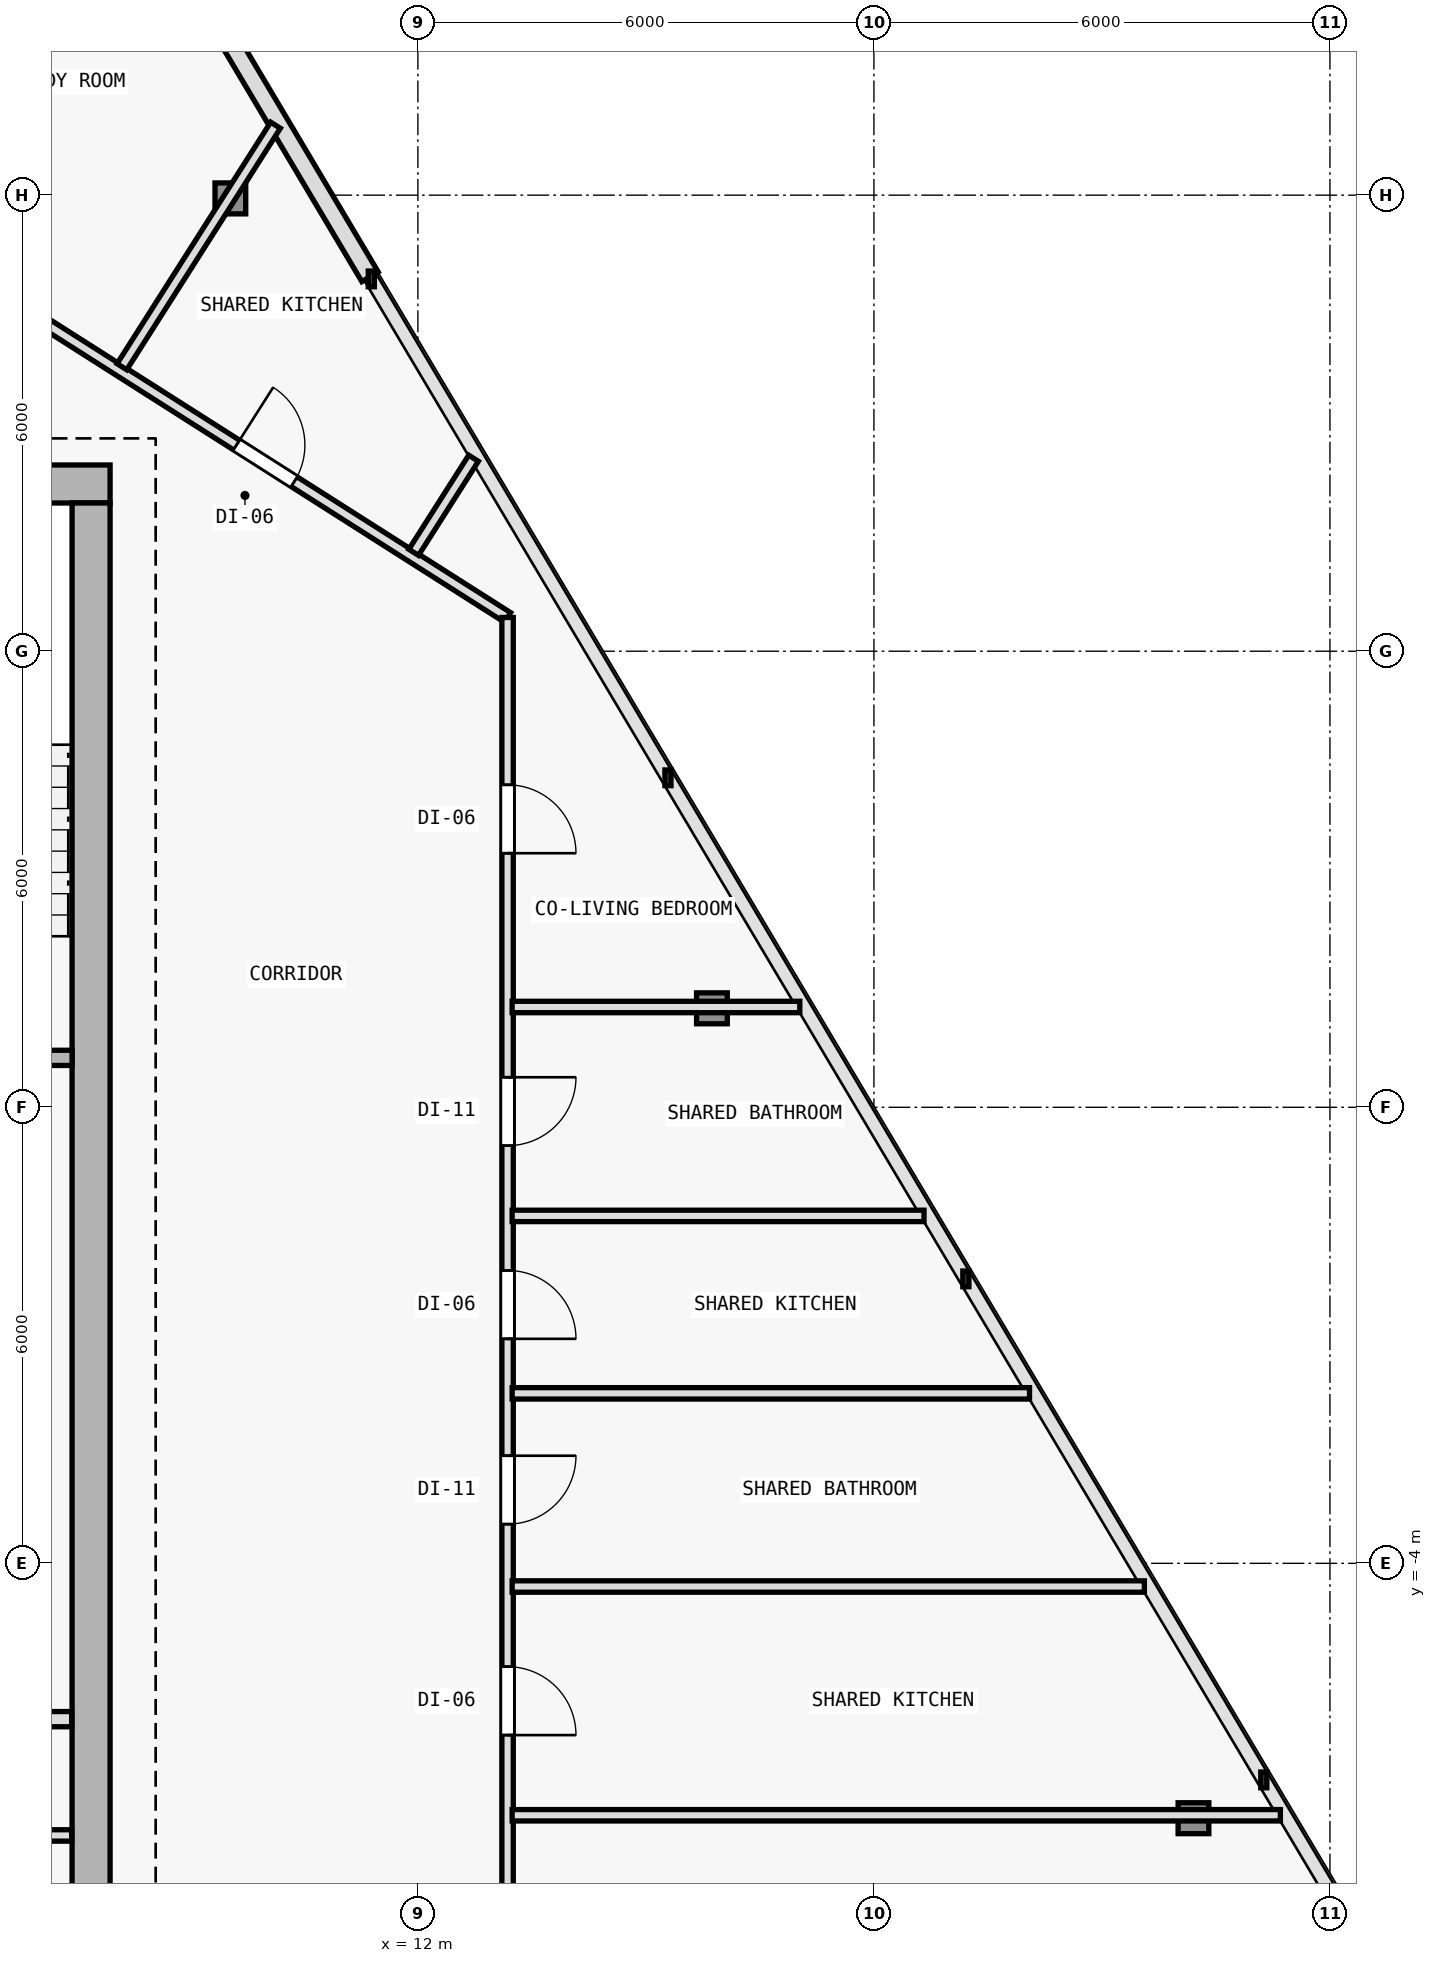
"""IFC4 building model, lengths in metres.
Left out: names, types, materials, properties, quantities, classifications, styles, units other than length and angle.
Written with IfcOpenShell. Run it as: python <this file> out.ifc"""

import sys

from ifc_helpers import new_model, si_unit, direction, frame, frame_2d, origin, origin_2d, place, context, subcontext, project, spatial, rectangle, i_section, extrude, element, fill, save


model = new_model("IFC4")
c1 = context("Model", 3, precision=1e-05, world=origin(), true_north=direction((0.0, 1.0)))
c2 = subcontext(c1, "Body", "Model", "MODEL_VIEW")
j1 = project(units=[si_unit("LENGTHUNIT", "METRE"), si_unit("PLANEANGLEUNIT", "RADIAN")], contexts=[c1])
p1 = place(None, origin())
s1 = spatial("IfcSite", under=j1, at=p1, CompositionType="ELEMENT")
p2 = place(p1, origin())
s2 = spatial("IfcBuilding", under=s1, at=p2, CompositionType="ELEMENT")
p3 = place(p2, frame((0.0, 0.0, 145.8)))
s3 = spatial("IfcBuildingStorey", under=s2, at=p3, CompositionType="ELEMENT", Elevation=145.8)
for number, where, z_axis, x_axis in (
    (1, (7.7, 10.2, 0.0), (0.0, 0.0, 1.0), (1.0, 0.0, 0.0)),
    (2, (7.7, 0.4, 0.0), (0.0, 0.0, 1.0), (1.0, 0.0, 0.0)),
):
    element("IfcColumn", number, at=place(p3, frame(where, z_axis=z_axis, x_axis=x_axis)), inside=s3, PredefinedType="COLUMN", context=c2, shape_type="SweptSolid", body=[
        extrude(i_section(OverallWidth=0.404, OverallDepth=0.407, WebThickness=0.017, FlangeThickness=0.028, FilletRadius=0.015, at=origin_2d()), origin(), (0.0, 0.0, 1.0), 3.6),
    ])
p4 = place(p3, frame((22.204, -7.353, 0.005), z_axis=(-0.026105663043, 0.021618752208, 0.999425396871), x_axis=(-0.637813971185, -0.770190455771, 0.0)))
e3 = element("IfcColumn", 3, at=p4, inside=s3, PredefinedType="COLUMN", context=c2, shape_type="SweptSolid", body=[
    extrude(i_section(OverallWidth=0.404, OverallDepth=0.407, WebThickness=0.017, FlangeThickness=0.028, FilletRadius=0.015, at=origin_2d()), origin(), (0.0, 0.0, 1.0), 3.591),
])
p5 = place(p3, frame((15.869, 3.302, 0.005), z_axis=(-0.018974023902, 0.009521015578, 0.999774642947), x_axis=(-0.44849454954, -0.893785566583, 0.0)))
e4 = element("IfcColumn", 4, at=p5, inside=s3, PredefinedType="COLUMN", context=c2, shape_type="SweptSolid", body=[
    extrude(i_section(OverallWidth=0.404, OverallDepth=0.407, WebThickness=0.017, FlangeThickness=0.028, FilletRadius=0.015, at=origin_2d()), origin(), (0.0, 0.0, 1.0), 3.59),
])
p6 = place(p3, frame((9.533, 13.957, 0.005), z_axis=(-0.011767054935, -0.002516653368, 0.999927598816), x_axis=(0.209143047003, -0.977885057607, 0.0)))
e5 = element("IfcColumn", 5, at=p6, inside=s3, PredefinedType="COLUMN", context=c2, shape_type="SweptSolid", body=[
    extrude(i_section(OverallWidth=0.404, OverallDepth=0.407, WebThickness=0.017, FlangeThickness=0.028, FilletRadius=0.015, at=origin_2d()), origin(), (0.0, 0.0, 1.0), 3.589),
])
p7 = place(p3, frame((5.862, 22.19, 0.0), z_axis=(0.0, 0.0, 1.0), x_axis=(0.511083986456, -0.859530778267, 0.0)))
e6 = element("IfcWall", 6, at=p7, inside=s3, PredefinedType="SOLIDWALL", context=c2, shape_type="SweptSolid", body=[
    extrude(rectangle(XDim=10.778, YDim=0.25, at=frame_2d((5.389, 0.0))), origin(), (0.0, 0.0, 1.0), 3.35),
])
p8 = place(p7, frame((4.939, 0.0, 0.62)))
e7 = element("IfcOpeningElement", 7, at=p8, cuts=e6, PredefinedType="OPENING", context=c2, shape_type="SweptSolid", body=[
    extrude(rectangle(XDim=0.9, YDim=1.6, at=frame_2d((0.45, 0.8))), frame((0.0, 0.135, 0.0), z_axis=(0.0, -1.0, 0.0), x_axis=(1.0, 0.0, 0.0)), (0.0, 0.0, 1.0), 0.27),
])
p9 = place(p3, frame((7.95, 10.2, 0.0), z_axis=(0.0, 0.0, 1.0), x_axis=(-1.0, 0.0, 0.0)))
e8 = element("IfcWall", 8, at=p9, inside=s3, PredefinedType="SHEAR", context=c2, shape_type="SweptSolid", body=[
    extrude(rectangle(XDim=15.9, YDim=0.5, at=frame_2d((7.95, 0.0))), origin(), (0.0, 0.0, 1.0), 3.35),
])
p10 = place(p9, frame((4.4, 0.0, 0.0)))
e9 = element("IfcOpeningElement", 9, at=p10, cuts=e8, PredefinedType="OPENING", context=c2, shape_type="SweptSolid", body=[
    extrude(rectangle(XDim=1.1, YDim=2.15, at=frame_2d((0.55, 1.075))), frame((0.0, 0.26, 0.0), z_axis=(0.0, -1.0, 0.0), x_axis=(1.0, 0.0, 0.0)), (0.0, 0.0, 1.0), 0.52),
])
p11 = place(p3, frame((7.7, 9.95, 0.0), z_axis=(0.0, 0.0, 1.0), x_axis=(0.0, -1.0, 0.0)))
e10 = element("IfcWall", 10, at=p11, inside=s3, PredefinedType="SHEAR", context=c2, shape_type="SweptSolid", body=[
    extrude(rectangle(XDim=19.1, YDim=0.5, at=frame_2d((9.55, 0.0))), origin(), (0.0, 0.0, 1.0), 3.35),
])
p12 = place(p3, frame((4.05, 2.65, 0.0), z_axis=(0.0, 0.0, 1.0), x_axis=(1.0, 0.0, 0.0)))
e11 = element("IfcWall", 11, at=p12, inside=s3, PredefinedType="SOLIDWALL", context=c2, shape_type="SweptSolid", body=[
    extrude(rectangle(XDim=3.4, YDim=0.2, at=frame_2d((1.7, 0.0))), origin(), (0.0, 0.0, 1.0), 3.35),
])
p13 = place(p3, frame((4.15, -6.05, 0.0), z_axis=(0.0, 0.0, 1.0), x_axis=(1.0, 0.0, 0.0)))
e12 = element("IfcWall", 12, at=p13, inside=s3, PredefinedType="SOLIDWALL", context=c2, shape_type="SweptSolid", body=[
    extrude(rectangle(XDim=3.295, YDim=0.2, at=frame_2d((1.647, 0.0))), origin(), (0.0, 0.0, 1.0), 3.35),
])
p14 = place(p3, frame((4.15, -7.58, 0.0), z_axis=(0.0, 0.0, 1.0), x_axis=(1.0, 0.0, 0.0)))
e13 = element("IfcWall", 13, at=p14, inside=s3, PredefinedType="PARTITIONING", context=c2, shape_type="SweptSolid", body=[
    extrude(rectangle(XDim=3.295, YDim=0.15, at=frame_2d((1.647, 0.0))), origin(), (0.0, 0.0, 1.0), 3.35),
])
p15 = place(p3, frame((7.023, 12.36, 0.0), z_axis=(0.0, 0.0, 1.0), x_axis=(0.84376480085, -0.536713108511, 0.0)))
e14 = element("IfcWall", 14, at=p15, inside=s3, PredefinedType="PARTITIONING", context=c2, shape_type="SweptSolid", body=[
    extrude(rectangle(XDim=7.297, YDim=0.15, at=frame_2d((3.648, 0.0))), origin(), (0.0, 0.0, 1.0), 2.725),
])
p16 = place(p15, frame((3.07, 0.0, 0.0)))
e15 = element("IfcOpeningElement", 15, at=p16, cuts=e14, PredefinedType="OPENING", context=c2, shape_type="SweptSolid", body=[
    extrude(rectangle(XDim=0.9, YDim=2.1, at=frame_2d((0.45, 1.05))), frame((0.0, 0.085, 0.0), z_axis=(0.0, -1.0, 0.0), x_axis=(1.0, 0.0, 0.0)), (0.0, 0.0, 1.0), 0.17),
])
p17 = place(p3, frame((13.18, 8.444, 0.0), z_axis=(0.0, 0.0, 1.0), x_axis=(0.0, -1.0, 0.0)))
e16 = element("IfcWall", 16, at=p17, inside=s3, PredefinedType="PARTITIONING", context=c2, shape_type="SweptSolid", body=[
    extrude(rectangle(XDim=20.004, YDim=0.15, at=frame_2d((10.002, 0.0))), origin(), (0.0, 0.0, 1.0), 2.775),
])
p18 = place(p17, frame((17.342, 0.0, 0.0)))
e17 = element("IfcOpeningElement", 17, at=p18, cuts=e16, PredefinedType="OPENING", context=c2, shape_type="SweptSolid", body=[
    extrude(rectangle(XDim=0.9, YDim=2.1, at=frame_2d((0.45, 1.05))), frame((0.0, 0.085, 0.0), z_axis=(0.0, -1.0, 0.0), x_axis=(1.0, 0.0, 0.0)), (0.0, 0.0, 1.0), 0.17),
])
p19 = place(p17, frame((13.804, 0.0, 0.0)))
e18 = element("IfcOpeningElement", 18, at=p19, cuts=e16, PredefinedType="OPENING", context=c2, shape_type="SweptSolid", body=[
    extrude(rectangle(XDim=0.9, YDim=2.1, at=frame_2d((0.45, 1.05))), frame((0.0, 0.085, 0.0), z_axis=(0.0, -1.0, 0.0), x_axis=(1.0, 0.0, 0.0)), (0.0, 0.0, 1.0), 0.17),
])
p20 = place(p17, frame((11.028, 0.0, 0.0)))
e19 = element("IfcOpeningElement", 19, at=p20, cuts=e16, PredefinedType="OPENING", context=c2, shape_type="SweptSolid", body=[
    extrude(rectangle(XDim=0.9, YDim=2.1, at=frame_2d((0.45, 1.05))), frame((0.0, 0.085, 0.0), z_axis=(0.0, -1.0, 0.0), x_axis=(1.0, 0.0, 0.0)), (0.0, 0.0, 1.0), 0.17),
])
p21 = place(p17, frame((8.59, 0.0, 0.0)))
e20 = element("IfcOpeningElement", 20, at=p21, cuts=e16, PredefinedType="OPENING", context=c2, shape_type="SweptSolid", body=[
    extrude(rectangle(XDim=0.9, YDim=2.1, at=frame_2d((0.45, 1.05))), frame((0.0, 0.085, 0.0), z_axis=(0.0, -1.0, 0.0), x_axis=(1.0, 0.0, 0.0)), (0.0, 0.0, 1.0), 0.17),
])
p22 = place(p17, frame((6.049, 0.0, 0.0)))
e21 = element("IfcOpeningElement", 21, at=p22, cuts=e16, PredefinedType="OPENING", context=c2, shape_type="SweptSolid", body=[
    extrude(rectangle(XDim=0.9, YDim=2.1, at=frame_2d((0.45, 1.05))), frame((0.0, 0.085, 0.0), z_axis=(0.0, -1.0, 0.0), x_axis=(1.0, 0.0, 0.0)), (0.0, 0.0, 1.0), 0.17),
])
p23 = place(p17, frame((2.201, 0.0, 0.0)))
e22 = element("IfcOpeningElement", 22, at=p23, cuts=e16, PredefinedType="OPENING", context=c2, shape_type="SweptSolid", body=[
    extrude(rectangle(XDim=0.9, YDim=2.1, at=frame_2d((0.45, 1.05))), frame((0.0, 0.085, 0.0), z_axis=(0.0, -1.0, 0.0), x_axis=(1.0, 0.0, 0.0)), (0.0, 0.0, 1.0), 0.17),
])
p24 = place(p3, frame((13.24, -7.314, 0.0), z_axis=(0.0, 0.0, 1.0), x_axis=(1.0, 0.0, 0.0)))
e23 = element("IfcWall", 23, at=p24, inside=s3, PredefinedType="PARTITIONING", context=c2, shape_type="SweptSolid", body=[
    extrude(rectangle(XDim=10.108, YDim=0.15, at=frame_2d((5.054, 0.0))), origin(), (0.0, 0.0, 1.0), 2.775),
])
p25 = place(p3, frame((13.24, 3.319, 0.0), z_axis=(0.0, 0.0, 1.0), x_axis=(1.0, 0.0, 0.0)))
e24 = element("IfcWall", 24, at=p25, inside=s3, PredefinedType="PARTITIONING", context=c2, shape_type="SweptSolid", body=[
    extrude(rectangle(XDim=3.785, YDim=0.15, at=frame_2d((1.892, 0.0))), origin(), (0.0, 0.0, 1.0), 2.885),
])
p26 = place(p3, frame((8.106, 11.743, 0.0), z_axis=(0.0, 0.0, 1.0), x_axis=(0.53670767223, 0.843768258807, 0.0)))
e25 = element("IfcWall", 25, at=p26, inside=s3, PredefinedType="PARTITIONING", context=c2, shape_type="SweptSolid", body=[
    extrude(rectangle(XDim=3.766, YDim=0.15, at=frame_2d((1.883, 0.0))), origin(), (0.0, 0.0, 1.0), 2.885),
])
p27 = place(p3, frame((13.24, -1.764, 0.0), z_axis=(0.0, 0.0, 1.0), x_axis=(1.0, 0.0, 0.0)))
e26 = element("IfcWall", 26, at=p27, inside=s3, PredefinedType="PARTITIONING", context=c2, shape_type="SweptSolid", body=[
    extrude(rectangle(XDim=6.807, YDim=0.15, at=frame_2d((3.404, 0.0))), origin(), (0.0, 0.0, 1.0), 2.885),
])
p28 = place(p3, frame((11.945, 9.301, 0.0), z_axis=(0.0, 0.0, 1.0), x_axis=(0.536638596357, 0.843812192908, 0.0)))
e27 = element("IfcWall", 27, at=p28, inside=s3, PredefinedType="PARTITIONING", context=c2, shape_type="SweptSolid", body=[
    extrude(rectangle(XDim=1.467, YDim=0.15, at=frame_2d((0.734, 0.0))), origin(), (0.0, 0.0, 1.0), 2.885),
])
p29 = place(p3, frame((13.24, -4.305, 0.0), z_axis=(0.0, 0.0, 1.0), x_axis=(1.0, 0.0, 0.0)))
e28 = element("IfcWall", 28, at=p29, inside=s3, PredefinedType="PARTITIONING", context=c2, shape_type="SweptSolid", body=[
    extrude(rectangle(XDim=8.318, YDim=0.15, at=frame_2d((4.159, 0.0))), origin(), (0.0, 0.0, 1.0), 2.885),
])
p30 = place(p3, frame((13.24, 0.571, 0.0), z_axis=(0.0, 0.0, 1.0), x_axis=(1.0, 0.0, 0.0)))
e29 = element("IfcWall", 29, at=p30, inside=s3, PredefinedType="PARTITIONING", context=c2, shape_type="SweptSolid", body=[
    extrude(rectangle(XDim=5.419, YDim=0.15, at=frame_2d((2.709, 0.0))), origin(), (0.0, 0.0, 1.0), 2.885),
])
p31 = place(p19, origin())
e30 = element("IfcDoor", 30, at=p31, inside=s3, OperationType="SINGLE_SWING_RIGHT", PredefinedType="DOOR", context=c2, shape_type="SweptSolid", body=[
    extrude(rectangle(XDim=0.9, YDim=2.1, at=frame_2d((0.45, 1.05))), frame((0.0, 0.025, 0.0), z_axis=(0.0, -1.0, 0.0), x_axis=(1.0, 0.0, 0.0)), (0.0, 0.0, 1.0), 0.05),
])
fill(e18, e30)
p32 = place(p20, origin())
e31 = element("IfcDoor", 31, at=p32, inside=s3, OperationType="SINGLE_SWING_LEFT", PredefinedType="DOOR", context=c2, shape_type="SweptSolid", body=[
    extrude(rectangle(XDim=0.9, YDim=2.1, at=frame_2d((0.45, 1.05))), frame((0.0, 0.025, 0.0), z_axis=(0.0, -1.0, 0.0), x_axis=(1.0, 0.0, 0.0)), (0.0, 0.0, 1.0), 0.05),
])
fill(e19, e31)
p33 = place(p21, origin())
e32 = element("IfcDoor", 32, at=p33, inside=s3, OperationType="SINGLE_SWING_RIGHT", PredefinedType="DOOR", context=c2, shape_type="SweptSolid", body=[
    extrude(rectangle(XDim=0.9, YDim=2.1, at=frame_2d((0.45, 1.05))), frame((0.0, 0.025, 0.0), z_axis=(0.0, -1.0, 0.0), x_axis=(1.0, 0.0, 0.0)), (0.0, 0.0, 1.0), 0.05),
])
fill(e20, e32)
p34 = place(p22, origin())
e33 = element("IfcDoor", 33, at=p34, inside=s3, OperationType="SINGLE_SWING_LEFT", PredefinedType="DOOR", context=c2, shape_type="SweptSolid", body=[
    extrude(rectangle(XDim=0.9, YDim=2.1, at=frame_2d((0.45, 1.05))), frame((0.0, 0.025, 0.0), z_axis=(0.0, -1.0, 0.0), x_axis=(1.0, 0.0, 0.0)), (0.0, 0.0, 1.0), 0.05),
])
fill(e21, e33)
p35 = place(p23, origin())
e34 = element("IfcDoor", 34, at=p35, inside=s3, OperationType="SINGLE_SWING_RIGHT", PredefinedType="DOOR", context=c2, shape_type="SweptSolid", body=[
    extrude(rectangle(XDim=0.9, YDim=2.1, at=frame_2d((0.45, 1.05))), frame((0.0, 0.025, 0.0), z_axis=(0.0, -1.0, 0.0), x_axis=(1.0, 0.0, 0.0)), (0.0, 0.0, 1.0), 0.05),
])
fill(e22, e34)
p36 = place(p16, origin())
e35 = element("IfcDoor", 35, at=p36, inside=s3, OperationType="SINGLE_SWING_LEFT", PredefinedType="DOOR", context=c2, shape_type="SweptSolid", body=[
    extrude(rectangle(XDim=0.9, YDim=2.1, at=frame_2d((0.45, 1.05))), frame((0.0, 0.025, 0.0), z_axis=(0.0, -1.0, 0.0), x_axis=(1.0, 0.0, 0.0)), (0.0, 0.0, 1.0), 0.05),
])
fill(e15, e35)
save(model, sys.argv[1])
